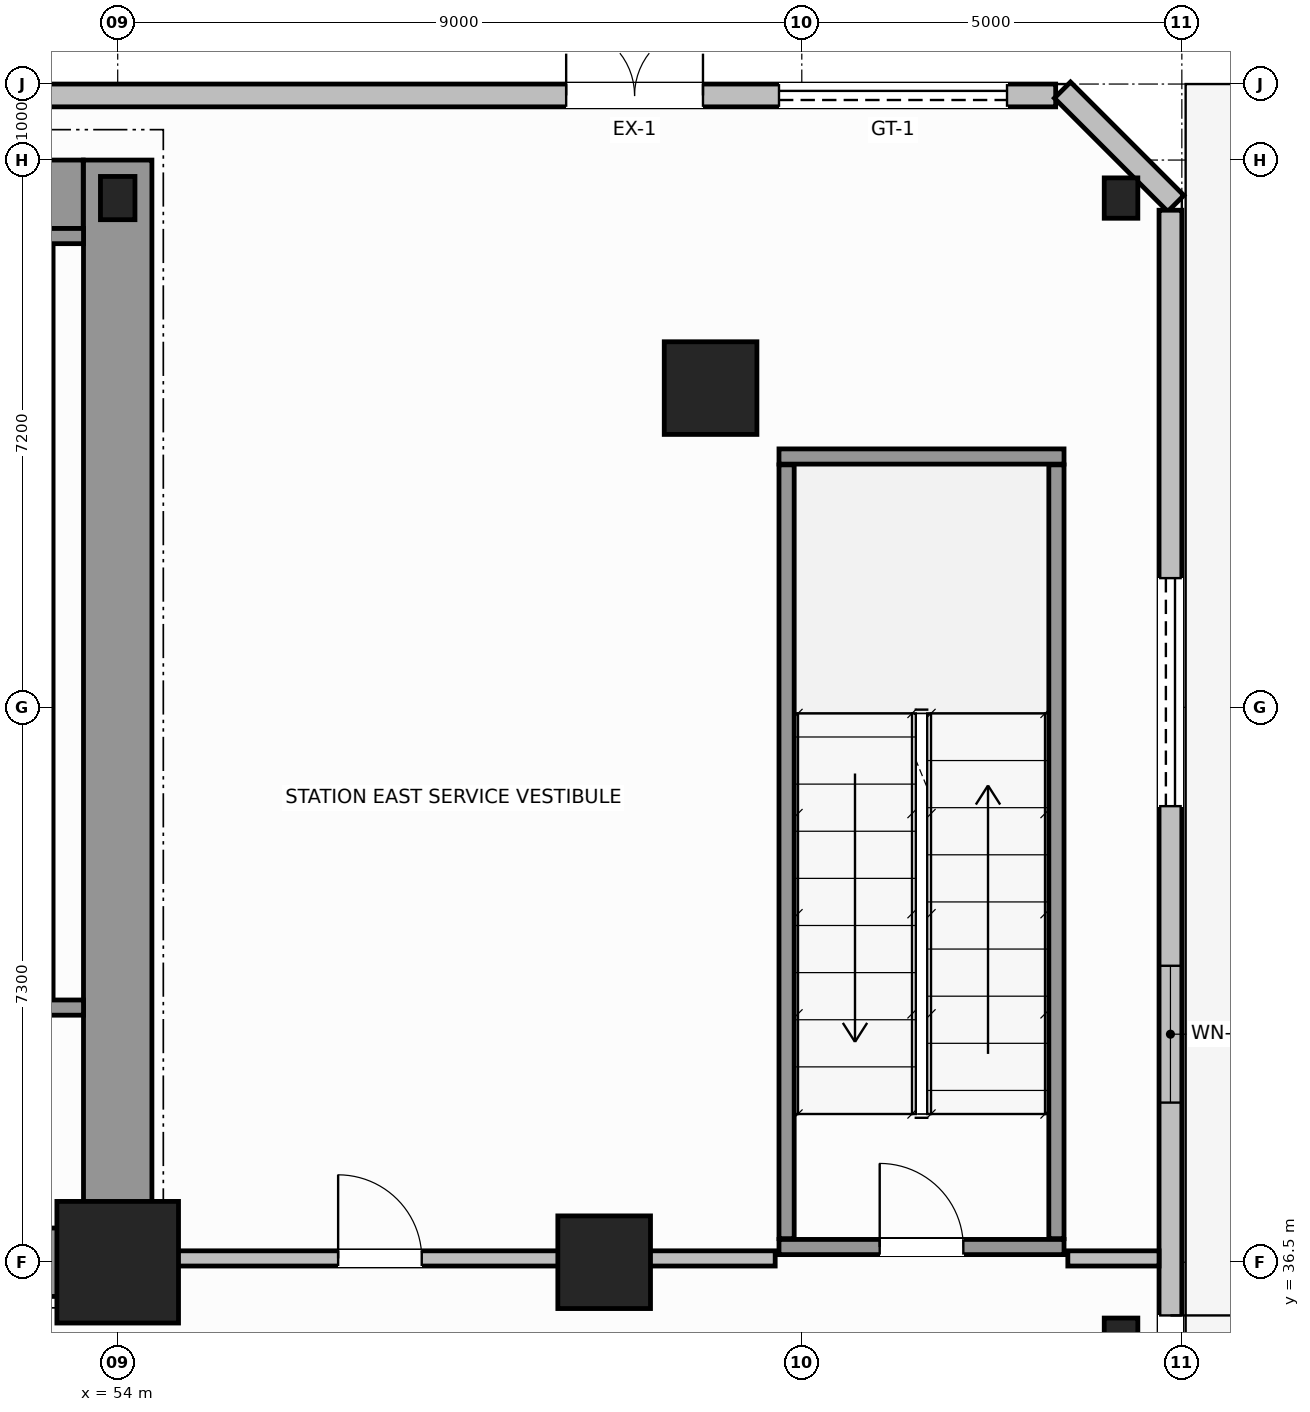
"""IFC4 building model, lengths in metres.
Left out: names, types, materials, properties, quantities, classifications, styles, units other than length and angle.
Written with IfcOpenShell. Run it as: python <this file> out.ifc"""

import sys

from ifc_helpers import new_model, si_unit, direction, frame, frame_2d, origin, origin_2d, place, context, subcontext, project, spatial, rectangle, hollow_circle, i_section, extrude, source, transform, mapped, element, fill, save


model = new_model("IFC4")
c1 = context("Model", 3, precision=1e-05, world=origin(), true_north=direction((0.0, 1.0)))
c2 = subcontext(c1, "Body", "Model", "MODEL_VIEW")
j1 = project(units=[si_unit("LENGTHUNIT", "METRE"), si_unit("PLANEANGLEUNIT", "RADIAN")], contexts=[c1])
p1 = place(None, origin())
s1 = spatial("IfcSite", under=j1, at=p1, CompositionType="ELEMENT")
p2 = place(p1, origin())
s2 = spatial("IfcBuilding", under=s1, at=p2, CompositionType="ELEMENT")
p3 = place(p2, origin())
s3 = spatial("IfcBuildingStorey", under=s2, at=p3, CompositionType="ELEMENT", Elevation=0.0)
m1 = source(origin(), c2, "Body", "SweptSolid", [
    extrude(rectangle(XDim=1.6, YDim=1.6, at=origin_2d()), origin(), (0.0, 0.0, 1.0), 5.6),
])
p4 = place(p3, frame((54.0, 36.5, 0.0), z_axis=(0.0, 0.0, 1.0), x_axis=(1.0, 0.0, 0.0)))
e1 = element("IfcColumn", 1, at=p4, inside=s3, PredefinedType="COLUMN", context=c2, shape_type="MappedRepresentation", body=[
    mapped(m1, transform((0.0, 0.0, 0.0), scale=1.0)),
])
m2 = source(origin(), c2, "Body", "SweptSolid", [
    extrude(i_section(OverallWidth=0.454, OverallDepth=0.569, WebThickness=0.078, FlangeThickness=0.08, FilletRadius=0.015, at=origin_2d()), origin(), (0.0, 0.0, 1.0), 5.6),
])
p5 = place(p3, frame((54.0, 50.5, 0.0), z_axis=(0.0, 0.0, 1.0), x_axis=(1.0, 0.0, 0.0)))
e2 = element("IfcColumn", 2, at=p5, inside=s3, PredefinedType="COLUMN", context=c2, shape_type="MappedRepresentation", body=[
    mapped(m2, transform((0.0, 0.0, 0.0), scale=1.0)),
])
m3 = source(origin(), c2, "Body", "SweptSolid", [
    extrude(hollow_circle(Radius=0.61, WallThickness=0.05, at=origin_2d()), origin(), (0.0, 0.0, 1.0), 5.6),
])
for number, where, z_axis, x_axis in (
    (3, (61.8, 48.0, 0.0), (0.0, 0.0, 1.0), (1.0, 0.0, 0.0)),
    (4, (60.4, 36.5, 0.0), (0.0, 0.0, 1.0), (1.0, 0.0, 0.0)),
):
    element("IfcColumn", number, at=place(p3, frame(where, z_axis=z_axis, x_axis=x_axis)), inside=s3, PredefinedType="COLUMN", context=c2, shape_type="MappedRepresentation", body=[
        mapped(m3, transform((0.0, 0.0, 0.0), scale=1.0)),
    ])
m4 = source(origin(), c2, "Body", "SweptSolid", [
    extrude(i_section(OverallWidth=0.442, OverallDepth=0.531, WebThickness=0.065, FlangeThickness=0.076, FilletRadius=0.015, at=origin_2d()), origin(), (0.0, 0.0, 1.0), 5.6),
])
for number, where, z_axis, x_axis in (
    (5, (67.2, 35.5, 0.0), (0.0, 0.0, 1.0), (1.0, 0.0, 0.0)),
    (6, (67.2, 50.5, 0.0), (0.0, 0.0, 1.0), (1.0, 0.0, 0.0)),
):
    element("IfcColumn", number, at=place(p3, frame(where, z_axis=z_axis, x_axis=x_axis)), inside=s3, PredefinedType="COLUMN", context=c2, shape_type="MappedRepresentation", body=[
        mapped(m4, transform((0.0, 0.0, 0.0), scale=1.0)),
    ])
p6 = place(p3, frame((34.002, 50.55, 0.0), z_axis=(0.0, 0.0, 1.0), x_axis=(1.0, 0.0, 0.0)))
e7 = element("IfcWall", 7, at=p6, inside=s3, PredefinedType="SHEAR", context=c2, shape_type="SweptSolid", body=[
    extrude(rectangle(XDim=19.544, YDim=0.9, at=frame_2d((9.772, 0.0))), origin(), (0.0, 0.0, 1.0), 5.6),
])
p7 = place(p3, frame((54.0, 36.5, 0.0), z_axis=(0.0, 0.0, 1.0), x_axis=(0.0, 1.0, 0.0)))
e8 = element("IfcWall", 8, at=p7, inside=s3, PredefinedType="SHEAR", context=c2, shape_type="SweptSolid", body=[
    extrude(rectangle(XDim=14.5, YDim=0.9, at=frame_2d((7.25, 0.0))), origin(), (0.0, 0.0, 1.0), 5.6),
])
p8 = place(p3, frame((49.8, 36.5, 0.0), z_axis=(0.0, 0.0, 1.0), x_axis=(1.0, 0.0, 0.0)))
e9 = element("IfcWall", 9, at=p8, inside=s3, PredefinedType="SHEAR", context=c2, shape_type="SweptSolid", body=[
    extrude(rectangle(XDim=3.73, YDim=0.9, at=frame_2d((1.865, 0.0))), origin(), (0.0, 0.0, 1.0), 4.12),
])
p9 = place(p3, frame((1.66, 51.85, 0.0), z_axis=(0.0, 0.0, 1.0), x_axis=(1.0, 0.0, 0.0)))
e10 = element("IfcWall", 10, at=p9, inside=s3, PredefinedType="STANDARD", context=c2, shape_type="SweptSolid", body=[
    extrude(rectangle(XDim=64.68, YDim=0.3, at=frame_2d((32.34, 0.0))), origin(), (0.0, 0.0, 1.0), 5.32),
])
p10 = place(p9, frame((58.24, 0.0, 0.0)))
e11 = element("IfcOpeningElement", 11, at=p10, cuts=e10, PredefinedType="OPENING", context=c2, shape_type="SweptSolid", body=[
    extrude(rectangle(XDim=1.8, YDim=2.4, at=frame_2d((0.9, 1.2))), frame((0.0, 0.16, 0.0), z_axis=(0.0, -1.0, 0.0), x_axis=(1.0, 0.0, 0.0)), (0.0, 0.0, 1.0), 0.32),
])
p11 = place(p9, frame((2.34, 0.0, 0.0)))
e12 = element("IfcOpeningElement", 12, at=p11, cuts=e10, PredefinedType="OPENING", context=c2, shape_type="SweptSolid", body=[
    extrude(rectangle(XDim=3.0, YDim=2.8, at=frame_2d((1.5, 1.4))), frame((0.0, 0.16, 0.0), z_axis=(0.0, -1.0, 0.0), x_axis=(1.0, 0.0, 0.0)), (0.0, 0.0, 1.0), 0.32),
])
p12 = place(p9, frame((61.04, 0.0, 0.0)))
e13 = element("IfcOpeningElement", 13, at=p12, cuts=e10, PredefinedType="OPENING", context=c2, shape_type="SweptSolid", body=[
    extrude(rectangle(XDim=3.0, YDim=2.8, at=frame_2d((1.5, 1.4))), frame((0.0, 0.16, 0.0), z_axis=(0.0, -1.0, 0.0), x_axis=(1.0, 0.0, 0.0)), (0.0, 0.0, 1.0), 0.32),
])
p13 = place(p3, frame((66.429, 51.921, 0.0), z_axis=(0.0, 0.0, 1.0), x_axis=(0.707106781187, -0.707106781187, 0.0)))
e14 = element("IfcWall", 14, at=p13, inside=s3, PredefinedType="STANDARD", context=c2, shape_type="SweptSolid", body=[
    extrude(rectangle(XDim=2.109, YDim=0.3, at=frame_2d((1.055, 0.0))), origin(), (0.0, 0.0, 1.0), 5.32),
])
p14 = place(p3, frame((67.85, 50.34, 0.0), z_axis=(0.0, 0.0, 1.0), x_axis=(0.0, -1.0, 0.0)))
e15 = element("IfcWall", 15, at=p14, inside=s3, PredefinedType="STANDARD", context=c2, shape_type="SweptSolid", body=[
    extrude(rectangle(XDim=48.68, YDim=0.3, at=frame_2d((24.34, 0.0))), origin(), (0.0, 0.0, 1.0), 5.32),
])
p15 = place(p14, frame((14.54, 0.0, 0.0)))
e16 = element("IfcOpeningElement", 16, at=p15, cuts=e15, PredefinedType="OPENING", context=c2, shape_type="SweptSolid", body=[
    extrude(rectangle(XDim=1.8, YDim=2.4, at=frame_2d((0.9, 1.2))), frame((0.0, 0.16, 0.0), z_axis=(0.0, -1.0, 0.0), x_axis=(1.0, 0.0, 0.0)), (0.0, 0.0, 1.0), 0.32),
])
p16 = place(p14, frame((23.44, 0.0, 0.0)))
e17 = element("IfcOpeningElement", 17, at=p16, cuts=e15, PredefinedType="OPENING", context=c2, shape_type="SweptSolid", body=[
    extrude(rectangle(XDim=1.8, YDim=2.4, at=frame_2d((0.9, 1.2))), frame((0.0, 0.16, 0.0), z_axis=(0.0, -1.0, 0.0), x_axis=(1.0, 0.0, 0.0)), (0.0, 0.0, 1.0), 0.32),
])
p17 = place(p14, frame((4.84, 0.0, 0.0)))
e18 = element("IfcOpeningElement", 18, at=p17, cuts=e15, PredefinedType="OPENING", context=c2, shape_type="SweptSolid", body=[
    extrude(rectangle(XDim=3.0, YDim=2.8, at=frame_2d((1.5, 1.4))), frame((0.0, 0.16, 0.0), z_axis=(0.0, -1.0, 0.0), x_axis=(1.0, 0.0, 0.0)), (0.0, 0.0, 1.0), 0.32),
])
p18 = place(p14, frame((28.34, 0.0, 0.0)))
e19 = element("IfcOpeningElement", 19, at=p18, cuts=e15, PredefinedType="OPENING", context=c2, shape_type="SweptSolid", body=[
    extrude(rectangle(XDim=3.0, YDim=2.8, at=frame_2d((1.5, 1.4))), frame((0.0, 0.16, 0.0), z_axis=(0.0, -1.0, 0.0), x_axis=(1.0, 0.0, 0.0)), (0.0, 0.0, 1.0), 0.32),
])
p19 = place(p14, frame((32.94, 0.0, 1.1)))
e20 = element("IfcOpeningElement", 20, at=p19, cuts=e15, PredefinedType="OPENING", context=c2, shape_type="SweptSolid", body=[
    extrude(rectangle(XDim=1.8, YDim=2.0, at=frame_2d((0.9, 1.0))), frame((0.0, 0.16, 0.0), z_axis=(0.0, -1.0, 0.0), x_axis=(1.0, 0.0, 0.0)), (0.0, 0.0, 1.0), 0.32),
])
p20 = place(p14, frame((18.94, 0.0, 1.1)))
e21 = element("IfcOpeningElement", 21, at=p20, cuts=e15, PredefinedType="OPENING", context=c2, shape_type="SweptSolid", body=[
    extrude(rectangle(XDim=1.8, YDim=2.0, at=frame_2d((0.9, 1.0))), frame((0.0, 0.16, 0.0), z_axis=(0.0, -1.0, 0.0), x_axis=(1.0, 0.0, 0.0)), (0.0, 0.0, 1.0), 0.32),
])
p21 = place(p14, frame((9.94, 0.0, 1.1)))
e22 = element("IfcOpeningElement", 22, at=p21, cuts=e15, PredefinedType="OPENING", context=c2, shape_type="SweptSolid", body=[
    extrude(rectangle(XDim=1.8, YDim=2.0, at=frame_2d((0.9, 1.0))), frame((0.0, 0.16, 0.0), z_axis=(0.0, -1.0, 0.0), x_axis=(1.0, 0.0, 0.0)), (0.0, 0.0, 1.0), 0.32),
])
p22 = place(p3, frame((49.4, 39.85, 0.0), z_axis=(0.0, 0.0, 1.0), x_axis=(1.0, 0.0, 0.0)))
e23 = element("IfcWall", 23, at=p22, inside=s3, PredefinedType="SOLIDWALL", context=c2, shape_type="SweptSolid", body=[
    extrude(rectangle(XDim=4.15, YDim=0.2, at=frame_2d((2.075, 0.0))), origin(), (0.0, 0.0, 1.0), 5.6),
])
p23 = place(p22, frame((1.325, 0.0, 0.0)))
e24 = element("IfcOpeningElement", 24, at=p23, cuts=e23, PredefinedType="OPENING", context=c2, shape_type="SweptSolid", body=[
    extrude(rectangle(XDim=1.1, YDim=2.15, at=frame_2d((0.55, 1.075))), frame((0.0, 0.11, 0.0), z_axis=(0.0, -1.0, 0.0), x_axis=(1.0, 0.0, 0.0)), (0.0, 0.0, 1.0), 0.22),
])
p24 = place(p3, frame((49.4, 50.0, 0.0), z_axis=(0.0, 0.0, 1.0), x_axis=(1.0, 0.0, 0.0)))
e25 = element("IfcWall", 25, at=p24, inside=s3, PredefinedType="SOLIDWALL", context=c2, shape_type="SweptSolid", body=[
    extrude(rectangle(XDim=4.15, YDim=0.2, at=frame_2d((2.075, 0.0))), origin(), (0.0, 0.0, 1.0), 5.6),
])
p25 = place(p3, frame((53.05, 39.96, 0.0), z_axis=(0.0, 0.0, 1.0), x_axis=(0.0, 1.0, 0.0)))
e26 = element("IfcWall", 26, at=p25, inside=s3, PredefinedType="SOLIDWALL", context=c2, shape_type="SweptSolid", body=[
    extrude(rectangle(XDim=9.93, YDim=0.2, at=frame_2d((4.965, 0.0))), origin(), (0.0, 0.0, 1.0), 5.6),
])
p26 = place(p3, frame((62.7, 36.7, 0.0), z_axis=(0.0, 0.0, 1.0), x_axis=(1.0, 0.0, 0.0)))
e27 = element("IfcWall", 27, at=p26, inside=s3, PredefinedType="SOLIDWALL", context=c2, shape_type="SweptSolid", body=[
    extrude(rectangle(XDim=3.75, YDim=0.2, at=frame_2d((1.875, 0.0))), origin(), (0.0, 0.0, 1.0), 5.6),
])
p27 = place(p26, frame((1.325, 0.0, 0.0)))
e28 = element("IfcOpeningElement", 28, at=p27, cuts=e27, PredefinedType="OPENING", context=c2, shape_type="SweptSolid", body=[
    extrude(rectangle(XDim=1.1, YDim=2.15, at=frame_2d((0.55, 1.075))), frame((0.0, 0.11, 0.0), z_axis=(0.0, -1.0, 0.0), x_axis=(1.0, 0.0, 0.0)), (0.0, 0.0, 1.0), 0.22),
])
p28 = place(p3, frame((62.7, 47.1, 0.0), z_axis=(0.0, 0.0, 1.0), x_axis=(1.0, 0.0, 0.0)))
e29 = element("IfcWall", 29, at=p28, inside=s3, PredefinedType="SOLIDWALL", context=c2, shape_type="SweptSolid", body=[
    extrude(rectangle(XDim=3.75, YDim=0.2, at=frame_2d((1.875, 0.0))), origin(), (0.0, 0.0, 1.0), 5.6),
])
for number, where, z_axis, x_axis in (
    (30, (62.8, 36.81, 0.0), (0.0, 0.0, 1.0), (0.0, 1.0, 0.0)),
    (31, (66.35, 36.81, 0.0), (0.0, 0.0, 1.0), (0.0, 1.0, 0.0)),
):
    element("IfcWall", number, at=place(p3, frame(where, z_axis=z_axis, x_axis=x_axis)), inside=s3, PredefinedType="SOLIDWALL", context=c2, shape_type="SweptSolid", body=[
        extrude(rectangle(XDim=10.18, YDim=0.2, at=frame_2d((5.09, 0.0))), origin(), (0.0, 0.0, 1.0), 5.6),
    ])
p29 = place(p3, frame((54.1, 36.55, 0.0), z_axis=(0.0, 0.0, 1.0), x_axis=(1.0, 0.0, 0.0)))
e32 = element("IfcWall", 32, at=p29, inside=s3, PredefinedType="SOLIDWALL", context=c2, shape_type="SweptSolid", body=[
    extrude(rectangle(XDim=8.55, YDim=0.2, at=frame_2d((4.275, 0.0))), origin(), (0.0, 0.0, 1.0), 4.4),
])
p30 = place(p29, frame((2.8, 0.0, 0.0)))
e33 = element("IfcOpeningElement", 33, at=p30, cuts=e32, PredefinedType="OPENING", context=c2, shape_type="SweptSolid", body=[
    extrude(rectangle(XDim=1.1, YDim=2.15, at=frame_2d((0.55, 1.075))), frame((0.0, 0.11, 0.0), z_axis=(0.0, -1.0, 0.0), x_axis=(1.0, 0.0, 0.0)), (0.0, 0.0, 1.0), 0.22),
])
p31 = place(p3, frame((66.5, 36.55, 0.0), z_axis=(0.0, 0.0, 1.0), x_axis=(1.0, 0.0, 0.0)))
e34 = element("IfcWall", 34, at=p31, inside=s3, PredefinedType="SOLIDWALL", context=c2, shape_type="SweptSolid", body=[
    extrude(rectangle(XDim=1.2, YDim=0.2, at=frame_2d((0.6, 0.0))), origin(), (0.0, 0.0, 1.0), 5.32),
])
m5 = source(origin(), c2, "Body", "SweptSolid", [
    extrude(rectangle(XDim=1.8, YDim=2.4, at=frame_2d((0.9, 1.2))), frame((0.0, 0.025, 0.0), z_axis=(0.0, -1.0, 0.0), x_axis=(1.0, 0.0, 0.0)), (0.0, 0.0, 1.0), 0.05),
])
p32 = place(p15, origin())
e35 = element("IfcDoor", 35, at=p32, inside=s3, OperationType="DOUBLE_DOOR_SINGLE_SWING", PredefinedType="DOOR", context=c2, shape_type="MappedRepresentation", body=[
    mapped(m5, transform((0.0, 0.0, 0.0), scale=1.0)),
])
fill(e16, e35)
p33 = place(p10, origin())
e36 = element("IfcDoor", 36, at=p33, inside=s3, OperationType="DOUBLE_DOOR_SINGLE_SWING", PredefinedType="DOOR", context=c2, shape_type="MappedRepresentation", body=[
    mapped(m5, transform((0.0, 0.0, 0.0), scale=1.0)),
])
fill(e11, e36)
m6 = source(origin(), c2, "Body", "SweptSolid", [
    extrude(rectangle(XDim=3.0, YDim=2.8, at=frame_2d((1.5, 1.4))), frame((0.0, 0.025, 0.0), z_axis=(0.0, -1.0, 0.0), x_axis=(1.0, 0.0, 0.0)), (0.0, 0.0, 1.0), 0.05),
])
p34 = place(p12, origin())
e37 = element("IfcDoor", 37, at=p34, inside=s3, OperationType="ROLLINGUP", PredefinedType="GATE", context=c2, shape_type="MappedRepresentation", body=[
    mapped(m6, transform((0.0, 0.0, 0.0), scale=1.0)),
])
fill(e13, e37)
p35 = place(p17, origin())
e38 = element("IfcDoor", 38, at=p35, inside=s3, OperationType="ROLLINGUP", PredefinedType="GATE", context=c2, shape_type="MappedRepresentation", body=[
    mapped(m6, transform((0.0, 0.0, 0.0), scale=1.0)),
])
fill(e18, e38)
m7 = source(origin(), c2, "Body", "SweptSolid", [
    extrude(rectangle(XDim=1.8, YDim=2.0, at=frame_2d((0.9, 1.0))), frame((0.0, 0.03, 0.0), z_axis=(0.0, -1.0, 0.0), x_axis=(1.0, 0.0, 0.0)), (0.0, 0.0, 1.0), 0.06),
])
p36 = place(p21, origin())
e39 = element("IfcWindow", 39, at=p36, inside=s3, PartitioningType="SINGLE_PANEL", PredefinedType="WINDOW", context=c2, shape_type="MappedRepresentation", body=[
    mapped(m7, transform((0.0, 0.0, 0.0), scale=1.0)),
])
fill(e22, e39)
m8 = source(origin(), c2, "Body", "SweptSolid", [
    extrude(rectangle(XDim=1.1, YDim=2.15, at=frame_2d((0.55, 1.075))), frame((0.0, 0.025, 0.0), z_axis=(0.0, -1.0, 0.0), x_axis=(1.0, 0.0, 0.0)), (0.0, 0.0, 1.0), 0.05),
])
p37 = place(p27, origin())
e40 = element("IfcDoor", 40, at=p37, inside=s3, OperationType="SINGLE_SWING_RIGHT", PredefinedType="DOOR", context=c2, shape_type="MappedRepresentation", body=[
    mapped(m8, transform((0.0, 0.0, 0.0), scale=1.0)),
])
fill(e28, e40)
p38 = place(p30, origin())
e41 = element("IfcDoor", 41, at=p38, inside=s3, OperationType="SINGLE_SWING_RIGHT", PredefinedType="DOOR", context=c2, shape_type="MappedRepresentation", body=[
    mapped(m8, transform((0.0, 0.0, 0.0), scale=1.0)),
])
fill(e33, e41)
save(model, sys.argv[1])
